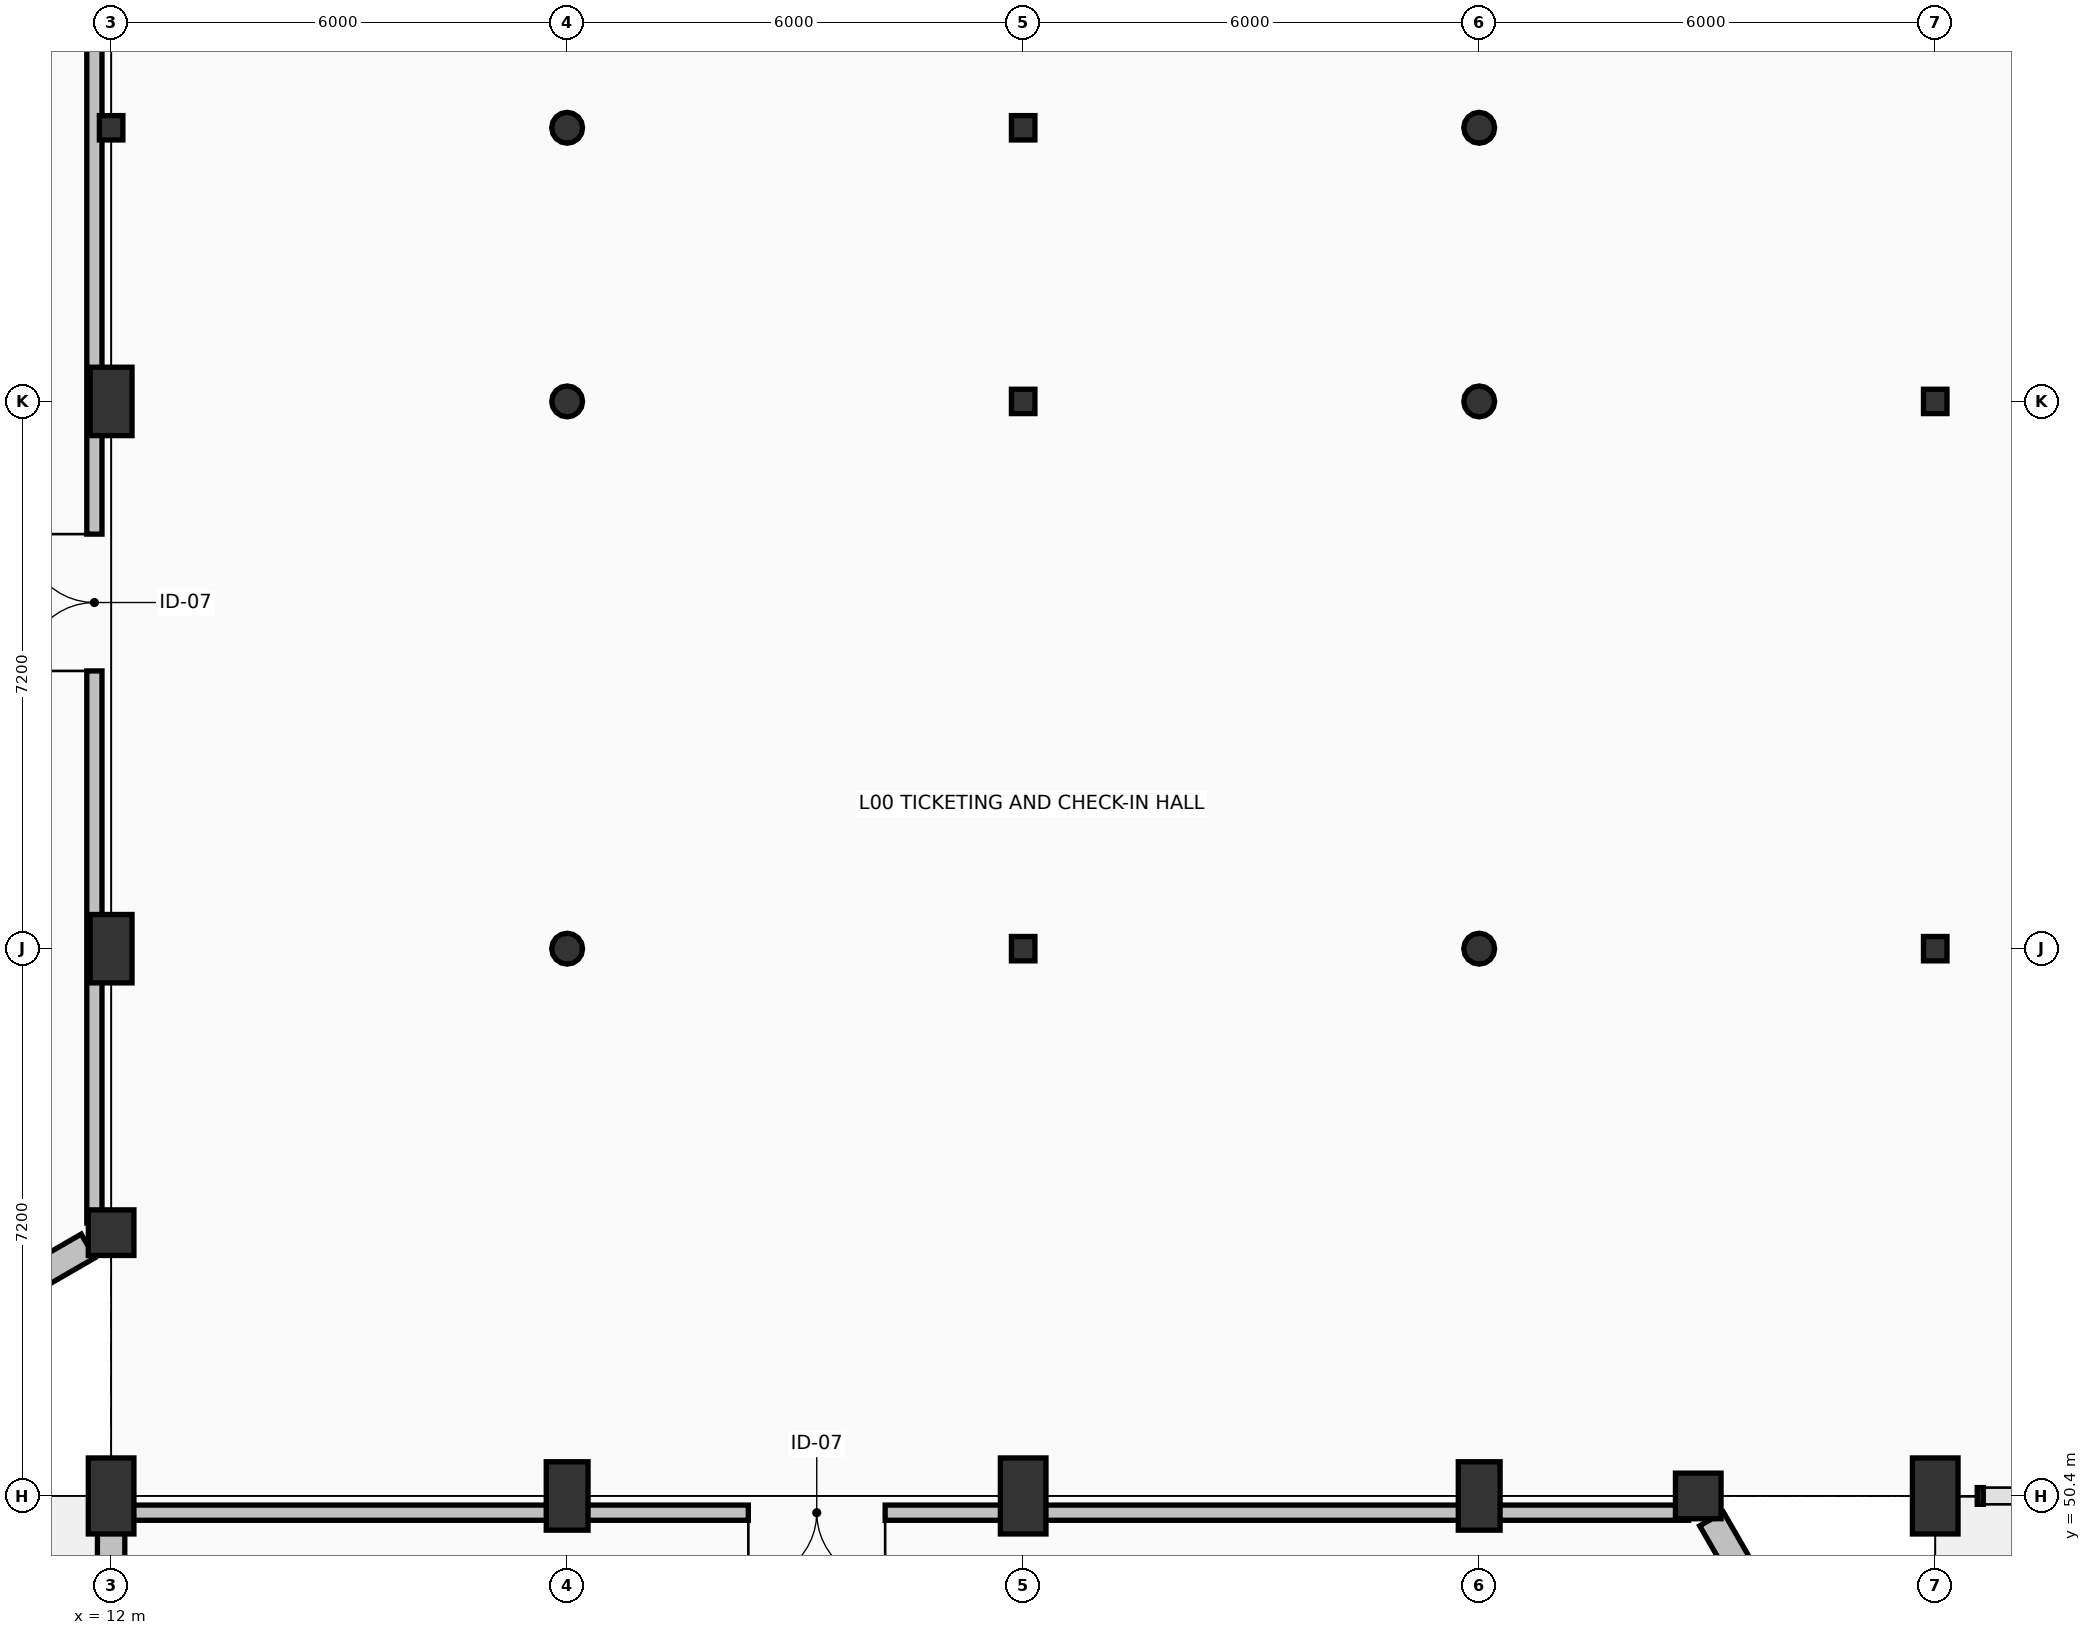
"""IFC4 building model, lengths in metres.
Left out: names, types, materials, properties, quantities, classifications, styles, units other than length and angle.
Written with IfcOpenShell. Run it as: python <this file> out.ifc"""

import sys

from ifc_helpers import new_model, si_unit, direction, frame, frame_2d, origin, origin_2d, place, context, subcontext, project, spatial, rectangle, hollow_circle, i_section, extrude, element, fill, save


model = new_model("IFC4")
c1 = context("Model", 3, precision=1e-05, world=origin(), true_north=direction((0.0, 1.0)))
c2 = subcontext(c1, "Body", "Model", "MODEL_VIEW")
j1 = project(units=[si_unit("LENGTHUNIT", "METRE"), si_unit("PLANEANGLEUNIT", "RADIAN")], contexts=[c1])
p1 = place(None, origin())
s1 = spatial("IfcSite", under=j1, at=p1, CompositionType="ELEMENT")
p2 = place(p1, origin())
s2 = spatial("IfcBuilding", under=s1, at=p2, CompositionType="ELEMENT")
p3 = place(p2, origin())
s3 = spatial("IfcBuildingStorey", under=s2, at=p3, CompositionType="ELEMENT", Elevation=0.0)
p4 = place(p3, frame((12.0, 50.4, -0.32), z_axis=(0.0, 0.0, 1.0), x_axis=(1.0, 0.0, 0.0)))
e1 = element("IfcColumn", 1, at=p4, inside=s3, PredefinedType="COLUMN", context=c2, shape_type="SweptSolid", body=[
    extrude(rectangle(XDim=0.6, YDim=1.0, at=origin_2d()), origin(), (0.0, 0.0, 1.0), 6.08),
])
p5 = place(p3, frame((18.0, 50.4, -0.32), z_axis=(0.0, 0.0, 1.0), x_axis=(1.0, 0.0, 0.0)))
e2 = element("IfcColumn", 2, at=p5, inside=s3, PredefinedType="COLUMN", context=c2, shape_type="SweptSolid", body=[
    extrude(rectangle(XDim=0.55, YDim=0.9, at=origin_2d()), origin(), (0.0, 0.0, 1.0), 6.08),
])
p6 = place(p3, frame((24.0, 50.4, -0.32), z_axis=(0.0, 0.0, 1.0), x_axis=(1.0, 0.0, 0.0)))
e3 = element("IfcColumn", 3, at=p6, inside=s3, PredefinedType="COLUMN", context=c2, shape_type="SweptSolid", body=[
    extrude(rectangle(XDim=0.6, YDim=1.0, at=origin_2d()), origin(), (0.0, 0.0, 1.0), 6.08),
])
p7 = place(p3, frame((30.0, 50.4, -0.32), z_axis=(0.0, 0.0, 1.0), x_axis=(1.0, 0.0, 0.0)))
e4 = element("IfcColumn", 4, at=p7, inside=s3, PredefinedType="COLUMN", context=c2, shape_type="SweptSolid", body=[
    extrude(rectangle(XDim=0.55, YDim=0.9, at=origin_2d()), origin(), (0.0, 0.0, 1.0), 6.08),
])
p8 = place(p3, frame((36.0, 50.4, -0.32), z_axis=(0.0, 0.0, 1.0), x_axis=(1.0, 0.0, 0.0)))
e5 = element("IfcColumn", 5, at=p8, inside=s3, PredefinedType="COLUMN", context=c2, shape_type="SweptSolid", body=[
    extrude(rectangle(XDim=0.6, YDim=1.0, at=origin_2d()), origin(), (0.0, 0.0, 1.0), 6.08),
])
for number, where, z_axis, x_axis in (
    (6, (12.0, 57.6, -0.32), (0.0, 0.0, 1.0), (1.0, 0.0, 0.0)),
    (7, (12.0, 64.8, -0.32), (0.0, 0.0, 1.0), (1.0, 0.0, 0.0)),
):
    element("IfcColumn", number, at=place(p3, frame(where, z_axis=z_axis, x_axis=x_axis)), inside=s3, PredefinedType="COLUMN", context=c2, shape_type="SweptSolid", body=[
        extrude(rectangle(XDim=0.55, YDim=0.9, at=origin_2d()), origin(), (0.0, 0.0, 1.0), 6.08),
    ])
for number, where, z_axis, x_axis in (
    (8, (12.0, 53.864, -0.32), (0.0, 0.0, 1.0), (1.0, 0.0, 0.0)),
    (9, (32.882, 50.4, -0.32), (0.0, 0.0, 1.0), (1.0, 0.0, 0.0)),
):
    element("IfcColumn", number, at=place(p3, frame(where, z_axis=z_axis, x_axis=x_axis)), inside=s3, PredefinedType="COLUMN", context=c2, shape_type="SweptSolid", body=[
        extrude(rectangle(XDim=0.6, YDim=0.6, at=origin_2d()), origin(), (0.0, 0.0, 1.0), 6.08),
    ])
p9 = place(p3, frame((12.0, 68.4, -0.32), z_axis=(0.0, 0.0, 1.0), x_axis=(1.0, 0.0, 0.0)))
e10 = element("IfcColumn", 10, at=p9, inside=s3, PredefinedType="COLUMN", context=c2, shape_type="SweptSolid", body=[
    extrude(i_section(OverallWidth=0.309, OverallDepth=0.321, WebThickness=0.014, FlangeThickness=0.022, FilletRadius=0.015, at=origin_2d()), origin(), (0.0, 0.0, 1.0), 5.8),
])
for number, where, z_axis, x_axis in (
    (11, (18.0, 57.6, -0.32), (0.0, 0.0, 1.0), (1.0, 0.0, 0.0)),
    (12, (18.0, 64.8, -0.32), (0.0, 0.0, 1.0), (1.0, 0.0, 0.0)),
    (13, (18.0, 68.4, -0.32), (0.0, 0.0, 1.0), (1.0, 0.0, 0.0)),
):
    element("IfcColumn", number, at=place(p3, frame(where, z_axis=z_axis, x_axis=x_axis)), inside=s3, PredefinedType="COLUMN", context=c2, shape_type="SweptSolid", body=[
        extrude(hollow_circle(Radius=0.203, WallThickness=0.016, at=origin_2d()), origin(), (0.0, 0.0, 1.0), 5.8),
    ])
for number, where, z_axis, x_axis in (
    (14, (24.0, 57.6, -0.32), (0.0, 0.0, 1.0), (1.0, 0.0, 0.0)),
    (15, (24.0, 64.8, -0.32), (0.0, 0.0, 1.0), (1.0, 0.0, 0.0)),
    (16, (24.0, 68.4, -0.32), (0.0, 0.0, 1.0), (1.0, 0.0, 0.0)),
):
    element("IfcColumn", number, at=place(p3, frame(where, z_axis=z_axis, x_axis=x_axis)), inside=s3, PredefinedType="COLUMN", context=c2, shape_type="SweptSolid", body=[
        extrude(i_section(OverallWidth=0.309, OverallDepth=0.321, WebThickness=0.014, FlangeThickness=0.022, FilletRadius=0.015, at=origin_2d()), origin(), (0.0, 0.0, 1.0), 5.8),
    ])
for number, where, z_axis, x_axis in (
    (17, (30.0, 57.6, -0.32), (0.0, 0.0, 1.0), (1.0, 0.0, 0.0)),
    (18, (30.0, 64.8, -0.32), (0.0, 0.0, 1.0), (1.0, 0.0, 0.0)),
    (19, (30.0, 68.4, -0.32), (0.0, 0.0, 1.0), (1.0, 0.0, 0.0)),
):
    element("IfcColumn", number, at=place(p3, frame(where, z_axis=z_axis, x_axis=x_axis)), inside=s3, PredefinedType="COLUMN", context=c2, shape_type="SweptSolid", body=[
        extrude(hollow_circle(Radius=0.203, WallThickness=0.016, at=origin_2d()), origin(), (0.0, 0.0, 1.0), 5.8),
    ])
for number, where, z_axis, x_axis in (
    (20, (36.0, 57.6, -0.32), (0.0, 0.0, 1.0), (1.0, 0.0, 0.0)),
    (21, (36.0, 64.8, -0.32), (0.0, 0.0, 1.0), (1.0, 0.0, 0.0)),
):
    element("IfcColumn", number, at=place(p3, frame(where, z_axis=z_axis, x_axis=x_axis)), inside=s3, PredefinedType="COLUMN", context=c2, shape_type="SweptSolid", body=[
        extrude(i_section(OverallWidth=0.309, OverallDepth=0.321, WebThickness=0.014, FlangeThickness=0.022, FilletRadius=0.015, at=origin_2d()), origin(), (0.0, 0.0, 1.0), 5.8),
    ])
p10 = place(p3, frame((6.303, 50.575, 0.0), z_axis=(0.0, 0.0, 1.0), x_axis=(0.866025010818, 0.500000680637, 0.0)))
e22 = element("IfcWall", 22, at=p10, inside=s3, PredefinedType="SOLIDWALL", context=c2, shape_type="SweptSolid", body=[
    extrude(rectangle(XDim=6.229, YDim=0.36, at=frame_2d((3.114, 0.0))), origin(), (0.0, 0.0, 1.0), 4.87),
])
p11 = place(p10, frame((2.487, 0.0, 0.0)))
e23 = element("IfcOpeningElement", 23, at=p11, cuts=e22, PredefinedType="OPENING", context=c2, shape_type="SweptSolid", body=[
    extrude(rectangle(XDim=1.1, YDim=2.15, at=frame_2d((0.55, 1.075))), frame((0.0, 0.19, 0.0), z_axis=(0.0, -1.0, 0.0), x_axis=(1.0, 0.0, 0.0)), (0.0, 0.0, 1.0), 0.38),
])
p12 = place(p3, frame((35.825, 45.303, 0.0), z_axis=(0.0, 0.0, 1.0), x_axis=(-0.499971886711, 0.866041634391, 0.0)))
e24 = element("IfcWall", 24, at=p12, inside=s3, PredefinedType="SOLIDWALL", context=c2, shape_type="SweptSolid", body=[
    extrude(rectangle(XDim=5.535, YDim=0.36, at=frame_2d((2.768, 0.0))), origin(), (0.0, 0.0, 1.0), 4.87),
])
p13 = place(p12, frame((1.766, 0.0, 1.65)))
e25 = element("IfcOpeningElement", 25, at=p13, cuts=e24, PredefinedType="OPENING", context=c2, shape_type="SweptSolid", body=[
    extrude(rectangle(XDim=1.9, YDim=0.9, at=frame_2d((0.95, 0.45))), frame((0.0, 0.19, 0.0), z_axis=(0.0, -1.0, 0.0), x_axis=(1.0, 0.0, 0.0)), (0.0, 0.0, 1.0), 0.38),
])
p14 = place(p3, frame((12.0, 50.05, 0.0), z_axis=(0.0, 0.0, 1.0), x_axis=(0.0, -1.0, 0.0)))
e26 = element("IfcWall", 26, at=p14, inside=s3, PredefinedType="SOLIDWALL", context=c2, shape_type="SweptSolid", body=[
    extrude(rectangle(XDim=10.1, YDim=0.36, at=frame_2d((5.05, 0.0))), origin(), (0.0, 0.0, 1.0), 4.87),
])
p15 = place(p14, frame((2.241, 0.0, 1.65)))
e27 = element("IfcOpeningElement", 27, at=p15, cuts=e26, PredefinedType="OPENING", context=c2, shape_type="SweptSolid", body=[
    extrude(rectangle(XDim=3.9, YDim=0.95, at=frame_2d((1.95, 0.475))), frame((0.0, 0.19, 0.0), z_axis=(0.0, -1.0, 0.0), x_axis=(1.0, 0.0, 0.0)), (0.0, 0.0, 1.0), 0.38),
])
p16 = place(p3, frame((11.78, 53.991, 0.0), z_axis=(0.0, 0.0, 1.0), x_axis=(0.0, 1.0, 0.0)))
e28 = element("IfcWall", 28, at=p16, inside=s3, PredefinedType="PARTITIONING", context=c2, shape_type="SweptSolid", body=[
    extrude(rectangle(XDim=28.818, YDim=0.2, at=frame_2d((14.409, 0.0))), origin(), (0.0, 0.0, 1.0), 4.87),
])
p17 = place(p16, frame((7.263, 0.0, 0.0)))
e29 = element("IfcOpeningElement", 29, at=p17, cuts=e28, PredefinedType="OPENING", context=c2, shape_type="SweptSolid", body=[
    extrude(rectangle(XDim=1.8, YDim=2.3, at=frame_2d((0.9, 1.15))), frame((0.0, 0.11, 0.0), z_axis=(0.0, -1.0, 0.0), x_axis=(1.0, 0.0, 0.0)), (0.0, 0.0, 1.0), 0.22),
])
p18 = place(p3, frame((32.755, 50.18, 0.0), z_axis=(0.0, 0.0, 1.0), x_axis=(-1.0, 0.0, 0.0)))
e30 = element("IfcWall", 30, at=p18, inside=s3, PredefinedType="PARTITIONING", context=c2, shape_type="SweptSolid", body=[
    extrude(rectangle(XDim=20.535, YDim=0.2, at=frame_2d((10.268, 0.0))), origin(), (0.0, 0.0, 1.0), 4.87),
])
p19 = place(p18, frame((10.571, 0.0, 0.0)))
e31 = element("IfcOpeningElement", 31, at=p19, cuts=e30, PredefinedType="OPENING", context=c2, shape_type="SweptSolid", body=[
    extrude(rectangle(XDim=1.8, YDim=2.3, at=frame_2d((0.9, 1.15))), frame((0.0, 0.11, 0.0), z_axis=(0.0, -1.0, 0.0), x_axis=(1.0, 0.0, 0.0)), (0.0, 0.0, 1.0), 0.22),
])
p20 = place(p17, origin())
e32 = element("IfcDoor", 32, at=p20, inside=s3, OperationType="DOUBLE_SWING_LEFT", PredefinedType="DOOR", context=c2, shape_type="SweptSolid", body=[
    extrude(rectangle(XDim=1.8, YDim=2.3, at=frame_2d((0.9, 1.15))), frame((0.0, 0.025, 0.0), z_axis=(0.0, -1.0, 0.0), x_axis=(1.0, 0.0, 0.0)), (0.0, 0.0, 1.0), 0.05),
])
fill(e29, e32)
p21 = place(p19, origin())
e33 = element("IfcDoor", 33, at=p21, inside=s3, OperationType="DOUBLE_SWING_LEFT", PredefinedType="DOOR", context=c2, shape_type="SweptSolid", body=[
    extrude(rectangle(XDim=1.8, YDim=2.3, at=frame_2d((0.9, 1.15))), frame((0.0, 0.025, 0.0), z_axis=(0.0, -1.0, 0.0), x_axis=(1.0, 0.0, 0.0)), (0.0, 0.0, 1.0), 0.05),
])
fill(e31, e33)
save(model, sys.argv[1])
